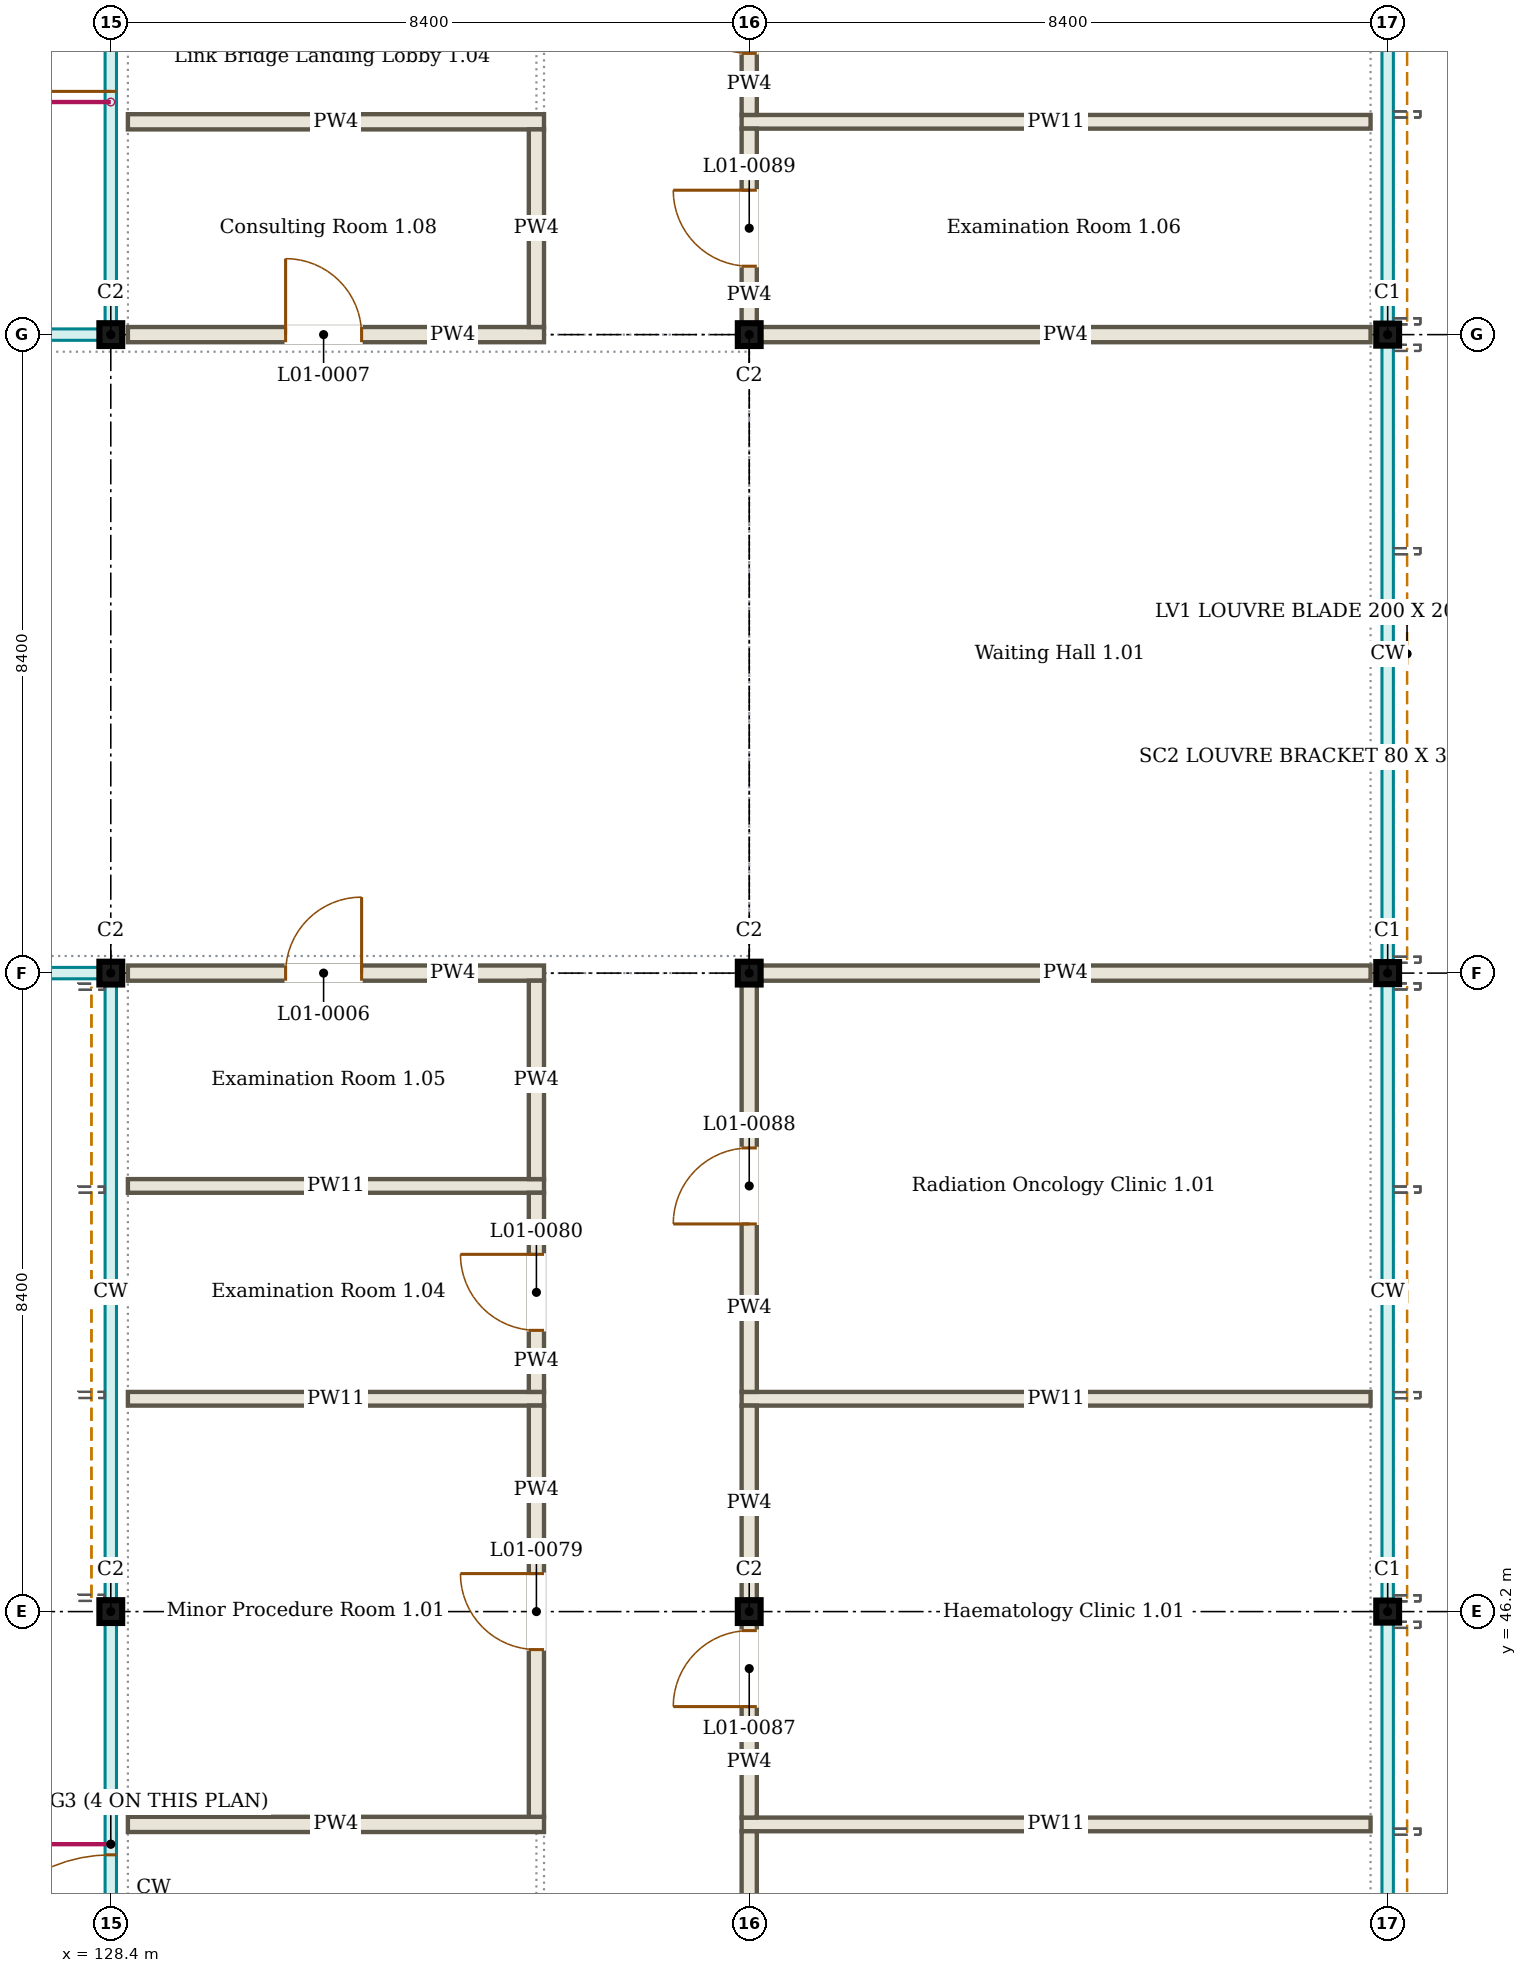
"""IFC4 building model, lengths in metres.
Left out: names, types, materials, properties, quantities, classifications, styles, units other than length and angle.
Written with IfcOpenShell. Run it as: python <this file> out.ifc"""

import sys

from ifc_helpers import new_model, si_unit, direction, frame, frame_2d, origin, origin_2d, place, context, subcontext, project, spatial, rectangle, i_section, extrude, element, fill, save


model = new_model("IFC4")
c1 = context("Model", 3, precision=1e-05, world=origin(), true_north=direction((0.0, 1.0)))
c2 = subcontext(c1, "Body", "Model", "MODEL_VIEW")
j1 = project(units=[si_unit("LENGTHUNIT", "METRE"), si_unit("PLANEANGLEUNIT", "RADIAN")], contexts=[c1])
p1 = place(None, origin())
s1 = spatial("IfcSite", under=j1, at=p1, CompositionType="ELEMENT")
p2 = place(p1, origin())
s2 = spatial("IfcBuilding", under=s1, at=p2, CompositionType="ELEMENT")
p3 = place(p2, frame((0.0, 0.0, 4.5)))
s3 = spatial("IfcBuildingStorey", under=s2, at=p3, CompositionType="ELEMENT", Elevation=4.5)
for number, where, z_axis, x_axis in (
    (1, (128.4, 46.2, 0.0), (0.0, 0.0, 1.0), (1.0, 0.0, 0.0)),
    (2, (136.8, 46.2, 0.0), (0.0, 0.0, 1.0), (1.0, 0.0, 0.0)),
):
    element("IfcColumn", number, at=place(p3, frame(where, z_axis=z_axis, x_axis=x_axis)), inside=s3, PredefinedType="COLUMN", context=c2, shape_type="SweptSolid", body=[
        extrude(i_section(OverallWidth=0.3, OverallDepth=0.3, WebThickness=0.011, FlangeThickness=0.019, FilletRadius=0.027, at=origin_2d()), origin(), (0.0, 0.0, 1.0), 4.5),
    ])
p4 = place(p3, frame((145.2, 46.2, 0.0), z_axis=(0.0, 0.0, 1.0), x_axis=(1.0, 0.0, 0.0)))
e3 = element("IfcColumn", 3, at=p4, inside=s3, PredefinedType="COLUMN", context=c2, shape_type="SweptSolid", body=[
    extrude(i_section(OverallWidth=0.3, OverallDepth=0.29, WebThickness=0.009, FlangeThickness=0.014, FilletRadius=0.027, at=origin_2d()), origin(), (0.0, 0.0, 1.0), 4.5),
])
for number, where, z_axis, x_axis in (
    (4, (128.4, 54.6, 0.0), (0.0, 0.0, 1.0), (1.0, 0.0, 0.0)),
    (5, (136.8, 54.6, 0.0), (0.0, 0.0, 1.0), (1.0, 0.0, 0.0)),
):
    element("IfcColumn", number, at=place(p3, frame(where, z_axis=z_axis, x_axis=x_axis)), inside=s3, PredefinedType="COLUMN", context=c2, shape_type="SweptSolid", body=[
        extrude(i_section(OverallWidth=0.3, OverallDepth=0.3, WebThickness=0.011, FlangeThickness=0.019, FilletRadius=0.027, at=origin_2d()), origin(), (0.0, 0.0, 1.0), 4.5),
    ])
p5 = place(p3, frame((145.2, 54.6, 0.0), z_axis=(0.0, 0.0, 1.0), x_axis=(1.0, 0.0, 0.0)))
e6 = element("IfcColumn", 6, at=p5, inside=s3, PredefinedType="COLUMN", context=c2, shape_type="SweptSolid", body=[
    extrude(i_section(OverallWidth=0.3, OverallDepth=0.29, WebThickness=0.009, FlangeThickness=0.014, FilletRadius=0.027, at=origin_2d()), origin(), (0.0, 0.0, 1.0), 4.5),
])
for number, where, z_axis, x_axis in (
    (7, (128.4, 63.0, 0.0), (0.0, 0.0, 1.0), (1.0, 0.0, 0.0)),
    (8, (136.8, 63.0, 0.0), (0.0, 0.0, 1.0), (1.0, 0.0, 0.0)),
):
    element("IfcColumn", number, at=place(p3, frame(where, z_axis=z_axis, x_axis=x_axis)), inside=s3, PredefinedType="COLUMN", context=c2, shape_type="SweptSolid", body=[
        extrude(i_section(OverallWidth=0.3, OverallDepth=0.3, WebThickness=0.011, FlangeThickness=0.019, FilletRadius=0.027, at=origin_2d()), origin(), (0.0, 0.0, 1.0), 4.5),
    ])
p6 = place(p3, frame((145.2, 63.0, 0.0), z_axis=(0.0, 0.0, 1.0), x_axis=(1.0, 0.0, 0.0)))
e9 = element("IfcColumn", 9, at=p6, inside=s3, PredefinedType="COLUMN", context=c2, shape_type="SweptSolid", body=[
    extrude(i_section(OverallWidth=0.3, OverallDepth=0.29, WebThickness=0.009, FlangeThickness=0.014, FilletRadius=0.027, at=origin_2d()), origin(), (0.0, 0.0, 1.0), 4.5),
])
p7 = place(p3, frame((128.625, 43.4, 0.0), z_axis=(0.0, 0.0, 1.0), x_axis=(1.0, 0.0, 0.0)))
e10 = element("IfcWall", 10, at=p7, inside=s3, PredefinedType="PARTITIONING", context=c2, shape_type="SweptSolid", body=[
    extrude(rectangle(XDim=5.475, YDim=0.2, at=frame_2d((2.738, 0.0))), origin(), (0.0, 0.0, 1.0), 3.996),
])
p8 = place(p3, frame((136.7, 43.4, 0.0), z_axis=(0.0, 0.0, 1.0), x_axis=(1.0, 0.0, 0.0)))
e11 = element("IfcWall", 11, at=p8, inside=s3, PredefinedType="PARTITIONING", context=c2, shape_type="SweptSolid", body=[
    extrude(rectangle(XDim=8.275, YDim=0.18, at=frame_2d((4.138, 0.0))), origin(), (0.0, 0.0, 1.0), 3.9),
])
p9 = place(p3, frame((128.625, 49.0, 0.0), z_axis=(0.0, 0.0, 1.0), x_axis=(1.0, 0.0, 0.0)))
e12 = element("IfcWall", 12, at=p9, inside=s3, PredefinedType="PARTITIONING", context=c2, shape_type="SweptSolid", body=[
    extrude(rectangle(XDim=5.475, YDim=0.18, at=frame_2d((2.738, 0.0))), origin(), (0.0, 0.0, 1.0), 3.996),
])
p10 = place(p3, frame((136.7, 49.0, 0.0), z_axis=(0.0, 0.0, 1.0), x_axis=(1.0, 0.0, 0.0)))
e13 = element("IfcWall", 13, at=p10, inside=s3, PredefinedType="PARTITIONING", context=c2, shape_type="SweptSolid", body=[
    extrude(rectangle(XDim=8.275, YDim=0.18, at=frame_2d((4.138, 0.0))), origin(), (0.0, 0.0, 1.0), 3.9),
])
p11 = place(p3, frame((128.625, 51.8, 0.0), z_axis=(0.0, 0.0, 1.0), x_axis=(1.0, 0.0, 0.0)))
e14 = element("IfcWall", 14, at=p11, inside=s3, PredefinedType="PARTITIONING", context=c2, shape_type="SweptSolid", body=[
    extrude(rectangle(XDim=5.475, YDim=0.18, at=frame_2d((2.738, 0.0))), origin(), (0.0, 0.0, 1.0), 3.996),
])
p12 = place(p3, frame((128.625, 54.6, 0.0), z_axis=(0.0, 0.0, 1.0), x_axis=(1.0, 0.0, 0.0)))
e15 = element("IfcWall", 15, at=p12, inside=s3, PredefinedType="PARTITIONING", context=c2, shape_type="SweptSolid", body=[
    extrude(rectangle(XDim=5.475, YDim=0.2, at=frame_2d((2.738, 0.0))), origin(), (0.0, 0.0, 1.0), 3.9),
])
p13 = place(p12, frame((2.075, 0.0, 0.0)))
e16 = element("IfcOpeningElement", 16, at=p13, cuts=e15, PredefinedType="OPENING", context=c2, shape_type="SweptSolid", body=[
    extrude(rectangle(XDim=1.0, YDim=2.1, at=frame_2d((0.5, 1.05))), frame((0.0, 0.11, 0.0), z_axis=(0.0, -1.0, 0.0), x_axis=(1.0, 0.0, 0.0)), (0.0, 0.0, 1.0), 0.22),
])
p14 = place(p3, frame((136.95, 54.6, 0.0), z_axis=(0.0, 0.0, 1.0), x_axis=(1.0, 0.0, 0.0)))
e17 = element("IfcWall", 17, at=p14, inside=s3, PredefinedType="PARTITIONING", context=c2, shape_type="SweptSolid", body=[
    extrude(rectangle(XDim=8.025, YDim=0.2, at=frame_2d((4.013, 0.0))), origin(), (0.0, 0.0, 1.0), 3.9),
])
p15 = place(p3, frame((128.625, 63.0, 0.0), z_axis=(0.0, 0.0, 1.0), x_axis=(1.0, 0.0, 0.0)))
e18 = element("IfcWall", 18, at=p15, inside=s3, PredefinedType="PARTITIONING", context=c2, shape_type="SweptSolid", body=[
    extrude(rectangle(XDim=5.475, YDim=0.2, at=frame_2d((2.738, 0.0))), origin(), (0.0, 0.0, 1.0), 3.9),
])
p16 = place(p15, frame((2.075, 0.0, 0.0)))
e19 = element("IfcOpeningElement", 19, at=p16, cuts=e18, PredefinedType="OPENING", context=c2, shape_type="SweptSolid", body=[
    extrude(rectangle(XDim=1.0, YDim=2.1, at=frame_2d((0.5, 1.05))), frame((0.0, 0.11, 0.0), z_axis=(0.0, -1.0, 0.0), x_axis=(1.0, 0.0, 0.0)), (0.0, 0.0, 1.0), 0.22),
])
p17 = place(p3, frame((136.95, 63.0, 0.0), z_axis=(0.0, 0.0, 1.0), x_axis=(1.0, 0.0, 0.0)))
e20 = element("IfcWall", 20, at=p17, inside=s3, PredefinedType="PARTITIONING", context=c2, shape_type="SweptSolid", body=[
    extrude(rectangle(XDim=8.025, YDim=0.2, at=frame_2d((4.013, 0.0))), origin(), (0.0, 0.0, 1.0), 3.9),
])
p18 = place(p3, frame((128.625, 65.8, 0.0), z_axis=(0.0, 0.0, 1.0), x_axis=(1.0, 0.0, 0.0)))
e21 = element("IfcWall", 21, at=p18, inside=s3, PredefinedType="PARTITIONING", context=c2, shape_type="SweptSolid", body=[
    extrude(rectangle(XDim=5.475, YDim=0.2, at=frame_2d((2.738, 0.0))), origin(), (0.0, 0.0, 1.0), 3.996),
])
p19 = place(p3, frame((136.7, 65.8, 0.0), z_axis=(0.0, 0.0, 1.0), x_axis=(1.0, 0.0, 0.0)))
e22 = element("IfcWall", 22, at=p19, inside=s3, PredefinedType="PARTITIONING", context=c2, shape_type="SweptSolid", body=[
    extrude(rectangle(XDim=8.275, YDim=0.18, at=frame_2d((4.138, 0.0))), origin(), (0.0, 0.0, 1.0), 3.9),
])
p20 = place(p3, frame((134.0, 43.5, 0.0), z_axis=(0.0, 0.0, 1.0), x_axis=(0.0, 1.0, 0.0)))
e23 = element("IfcWall", 23, at=p20, inside=s3, PredefinedType="PARTITIONING", context=c2, shape_type="SweptSolid", body=[
    extrude(rectangle(XDim=5.41, YDim=0.2, at=frame_2d((2.705, 0.0))), origin(), (0.0, 0.0, 1.0), 3.9),
])
p21 = place(p20, frame((2.2, 0.0, 0.0)))
e24 = element("IfcOpeningElement", 24, at=p21, cuts=e23, PredefinedType="OPENING", context=c2, shape_type="SweptSolid", body=[
    extrude(rectangle(XDim=1.0, YDim=2.1, at=frame_2d((0.5, 1.05))), frame((0.0, 0.11, 0.0), z_axis=(0.0, -1.0, 0.0), x_axis=(1.0, 0.0, 0.0)), (0.0, 0.0, 1.0), 0.22),
])
p22 = place(p3, frame((134.0, 49.09, 0.0), z_axis=(0.0, 0.0, 1.0), x_axis=(0.0, 1.0, 0.0)))
e25 = element("IfcWall", 25, at=p22, inside=s3, PredefinedType="PARTITIONING", context=c2, shape_type="SweptSolid", body=[
    extrude(rectangle(XDim=2.62, YDim=0.2, at=frame_2d((1.31, 0.0))), origin(), (0.0, 0.0, 1.0), 3.996),
])
p23 = place(p22, frame((0.81, 0.0, 0.0)))
e26 = element("IfcOpeningElement", 26, at=p23, cuts=e25, PredefinedType="OPENING", context=c2, shape_type="SweptSolid", body=[
    extrude(rectangle(XDim=1.0, YDim=2.1, at=frame_2d((0.5, 1.05))), frame((0.0, 0.11, 0.0), z_axis=(0.0, -1.0, 0.0), x_axis=(1.0, 0.0, 0.0)), (0.0, 0.0, 1.0), 0.22),
])
p24 = place(p3, frame((134.0, 51.89, 0.0), z_axis=(0.0, 0.0, 1.0), x_axis=(0.0, 1.0, 0.0)))
e27 = element("IfcWall", 27, at=p24, inside=s3, PredefinedType="PARTITIONING", context=c2, shape_type="SweptSolid", body=[
    extrude(rectangle(XDim=2.61, YDim=0.2, at=frame_2d((1.305, 0.0))), origin(), (0.0, 0.0, 1.0), 3.996),
])
p25 = place(p3, frame((134.0, 63.1, 0.0), z_axis=(0.0, 0.0, 1.0), x_axis=(0.0, 1.0, 0.0)))
e28 = element("IfcWall", 28, at=p25, inside=s3, PredefinedType="PARTITIONING", context=c2, shape_type="SweptSolid", body=[
    extrude(rectangle(XDim=2.6, YDim=0.2, at=frame_2d((1.3, 0.0))), origin(), (0.0, 0.0, 1.0), 3.996),
])
p26 = place(p3, frame((136.8, 37.8, 0.0), z_axis=(0.0, 0.0, 1.0), x_axis=(0.0, 1.0, 0.0)))
e29 = element("IfcWall", 29, at=p26, inside=s3, PredefinedType="PARTITIONING", context=c2, shape_type="SweptSolid", body=[
    extrude(rectangle(XDim=5.51, YDim=0.2, at=frame_2d((2.755, 0.0))), origin(), (0.0, 0.0, 1.0), 3.9),
])
p27 = place(p26, frame((2.3, 0.0, 0.0)))
e30 = element("IfcOpeningElement", 30, at=p27, cuts=e29, PredefinedType="OPENING", context=c2, shape_type="SweptSolid", body=[
    extrude(rectangle(XDim=1.0, YDim=2.1, at=frame_2d((0.5, 1.05))), frame((0.0, 0.11, 0.0), z_axis=(0.0, -1.0, 0.0), x_axis=(1.0, 0.0, 0.0)), (0.0, 0.0, 1.0), 0.22),
])
p28 = place(p3, frame((136.8, 43.49, 0.0), z_axis=(0.0, 0.0, 1.0), x_axis=(0.0, 1.0, 0.0)))
e31 = element("IfcWall", 31, at=p28, inside=s3, PredefinedType="PARTITIONING", context=c2, shape_type="SweptSolid", body=[
    extrude(rectangle(XDim=2.56, YDim=0.2, at=frame_2d((1.28, 0.0))), origin(), (0.0, 0.0, 1.0), 3.9),
])
p29 = place(p28, frame((1.46, 0.0, 0.0)))
e32 = element("IfcOpeningElement", 32, at=p29, cuts=e31, PredefinedType="OPENING", context=c2, shape_type="SweptSolid", body=[
    extrude(rectangle(XDim=1.0, YDim=2.1, at=frame_2d((0.5, 1.05))), frame((0.0, 0.11, 0.0), z_axis=(0.0, -1.0, 0.0), x_axis=(1.0, 0.0, 0.0)), (0.0, 0.0, 1.0), 0.22),
])
p30 = place(p3, frame((136.8, 46.35, 0.0), z_axis=(0.0, 0.0, 1.0), x_axis=(0.0, 1.0, 0.0)))
e33 = element("IfcWall", 33, at=p30, inside=s3, PredefinedType="PARTITIONING", context=c2, shape_type="SweptSolid", body=[
    extrude(rectangle(XDim=2.56, YDim=0.2, at=frame_2d((1.28, 0.0))), origin(), (0.0, 0.0, 1.0), 3.9),
])
p31 = place(p3, frame((136.8, 49.09, 0.0), z_axis=(0.0, 0.0, 1.0), x_axis=(0.0, 1.0, 0.0)))
e34 = element("IfcWall", 34, at=p31, inside=s3, PredefinedType="PARTITIONING", context=c2, shape_type="SweptSolid", body=[
    extrude(rectangle(XDim=5.36, YDim=0.2, at=frame_2d((2.68, 0.0))), origin(), (0.0, 0.0, 1.0), 3.9),
])
p32 = place(p31, frame((2.21, 0.0, 0.0)))
e35 = element("IfcOpeningElement", 35, at=p32, cuts=e34, PredefinedType="OPENING", context=c2, shape_type="SweptSolid", body=[
    extrude(rectangle(XDim=1.0, YDim=2.1, at=frame_2d((0.5, 1.05))), frame((0.0, 0.11, 0.0), z_axis=(0.0, -1.0, 0.0), x_axis=(1.0, 0.0, 0.0)), (0.0, 0.0, 1.0), 0.22),
])
p33 = place(p3, frame((136.8, 63.15, 0.0), z_axis=(0.0, 0.0, 1.0), x_axis=(0.0, 1.0, 0.0)))
e36 = element("IfcWall", 36, at=p33, inside=s3, PredefinedType="PARTITIONING", context=c2, shape_type="SweptSolid", body=[
    extrude(rectangle(XDim=2.56, YDim=0.2, at=frame_2d((1.28, 0.0))), origin(), (0.0, 0.0, 1.0), 3.9),
])
p34 = place(p33, frame((0.75, 0.0, 0.0)))
e37 = element("IfcOpeningElement", 37, at=p34, cuts=e36, PredefinedType="OPENING", context=c2, shape_type="SweptSolid", body=[
    extrude(rectangle(XDim=1.0, YDim=2.1, at=frame_2d((0.5, 1.05))), frame((0.0, 0.11, 0.0), z_axis=(0.0, -1.0, 0.0), x_axis=(1.0, 0.0, 0.0)), (0.0, 0.0, 1.0), 0.22),
])
p35 = place(p3, frame((136.8, 65.89, 0.0), z_axis=(0.0, 0.0, 1.0), x_axis=(0.0, 1.0, 0.0)))
e38 = element("IfcWall", 38, at=p35, inside=s3, PredefinedType="PARTITIONING", context=c2, shape_type="SweptSolid", body=[
    extrude(rectangle(XDim=2.62, YDim=0.2, at=frame_2d((1.31, 0.0))), origin(), (0.0, 0.0, 1.0), 3.9),
])
p36 = place(p35, frame((0.81, 0.0, 0.0)))
e39 = element("IfcOpeningElement", 39, at=p36, cuts=e38, PredefinedType="OPENING", context=c2, shape_type="SweptSolid", body=[
    extrude(rectangle(XDim=1.0, YDim=2.1, at=frame_2d((0.5, 1.05))), frame((0.0, 0.11, 0.0), z_axis=(0.0, -1.0, 0.0), x_axis=(1.0, 0.0, 0.0)), (0.0, 0.0, 1.0), 0.22),
])
p37 = place(p3, frame((128.4, 37.95, 0.0), z_axis=(0.0, 0.0, 1.0), x_axis=(0.0, 1.0, 0.0)))
p38 = place(p37, frame((3.05, 0.0, 0.0)))
p39 = place(p38, origin())
e40 = element("IfcDoor", 40, at=p39, inside=s3, OperationType="SINGLE_SWING_LEFT", PredefinedType="DOOR", context=c2, shape_type="SweptSolid", body=[
    extrude(rectangle(XDim=2.0, YDim=2.4, at=frame_2d((1.0, 1.2))), frame((0.0, 0.025, 0.0), z_axis=(0.0, -1.0, 0.0), x_axis=(1.0, 0.0, 0.0)), (0.0, 0.0, 1.0), 0.05),
])
p40 = place(p3, frame((128.4, 63.15, 0.0), z_axis=(0.0, 0.0, 1.0), x_axis=(0.0, 1.0, 0.0)))
p41 = place(p40, frame((3.05, 0.0, 0.0)))
p42 = place(p41, origin())
e41 = element("IfcDoor", 41, at=p42, inside=s3, OperationType="SINGLE_SWING_LEFT", PredefinedType="DOOR", context=c2, shape_type="SweptSolid", body=[
    extrude(rectangle(XDim=2.0, YDim=2.4, at=frame_2d((1.0, 1.2))), frame((0.0, 0.025, 0.0), z_axis=(0.0, -1.0, 0.0), x_axis=(1.0, 0.0, 0.0)), (0.0, 0.0, 1.0), 0.05),
])
p43 = place(p13, origin())
e42 = element("IfcDoor", 42, at=p43, inside=s3, OperationType="SINGLE_SWING_RIGHT", PredefinedType="DOOR", context=c2, shape_type="SweptSolid", body=[
    extrude(rectangle(XDim=1.0, YDim=2.1, at=frame_2d((0.5, 1.05))), frame((0.0, 0.025, 0.0), z_axis=(0.0, -1.0, 0.0), x_axis=(1.0, 0.0, 0.0)), (0.0, 0.0, 1.0), 0.05),
])
fill(e16, e42)
p44 = place(p16, origin())
e43 = element("IfcDoor", 43, at=p44, inside=s3, OperationType="SINGLE_SWING_LEFT", PredefinedType="DOOR", context=c2, shape_type="SweptSolid", body=[
    extrude(rectangle(XDim=1.0, YDim=2.1, at=frame_2d((0.5, 1.05))), frame((0.0, 0.025, 0.0), z_axis=(0.0, -1.0, 0.0), x_axis=(1.0, 0.0, 0.0)), (0.0, 0.0, 1.0), 0.05),
])
fill(e19, e43)
p45 = place(p21, origin())
e44 = element("IfcDoor", 44, at=p45, inside=s3, OperationType="SINGLE_SWING_RIGHT", PredefinedType="DOOR", context=c2, shape_type="SweptSolid", body=[
    extrude(rectangle(XDim=1.0, YDim=2.1, at=frame_2d((0.5, 1.05))), frame((0.0, 0.025, 0.0), z_axis=(0.0, -1.0, 0.0), x_axis=(1.0, 0.0, 0.0)), (0.0, 0.0, 1.0), 0.05),
])
fill(e24, e44)
p46 = place(p23, origin())
e45 = element("IfcDoor", 45, at=p46, inside=s3, OperationType="SINGLE_SWING_RIGHT", PredefinedType="DOOR", context=c2, shape_type="SweptSolid", body=[
    extrude(rectangle(XDim=1.0, YDim=2.1, at=frame_2d((0.5, 1.05))), frame((0.0, 0.025, 0.0), z_axis=(0.0, -1.0, 0.0), x_axis=(1.0, 0.0, 0.0)), (0.0, 0.0, 1.0), 0.05),
])
fill(e26, e45)
p47 = place(p29, origin())
e46 = element("IfcDoor", 46, at=p47, inside=s3, OperationType="SINGLE_SWING_LEFT", PredefinedType="DOOR", context=c2, shape_type="SweptSolid", body=[
    extrude(rectangle(XDim=1.0, YDim=2.1, at=frame_2d((0.5, 1.05))), frame((0.0, 0.025, 0.0), z_axis=(0.0, -1.0, 0.0), x_axis=(1.0, 0.0, 0.0)), (0.0, 0.0, 1.0), 0.05),
])
fill(e32, e46)
p48 = place(p32, origin())
e47 = element("IfcDoor", 47, at=p48, inside=s3, OperationType="SINGLE_SWING_LEFT", PredefinedType="DOOR", context=c2, shape_type="SweptSolid", body=[
    extrude(rectangle(XDim=1.0, YDim=2.1, at=frame_2d((0.5, 1.05))), frame((0.0, 0.025, 0.0), z_axis=(0.0, -1.0, 0.0), x_axis=(1.0, 0.0, 0.0)), (0.0, 0.0, 1.0), 0.05),
])
fill(e35, e47)
p49 = place(p34, origin())
e48 = element("IfcDoor", 48, at=p49, inside=s3, OperationType="SINGLE_SWING_RIGHT", PredefinedType="DOOR", context=c2, shape_type="SweptSolid", body=[
    extrude(rectangle(XDim=1.0, YDim=2.1, at=frame_2d((0.5, 1.05))), frame((0.0, 0.025, 0.0), z_axis=(0.0, -1.0, 0.0), x_axis=(1.0, 0.0, 0.0)), (0.0, 0.0, 1.0), 0.05),
])
fill(e37, e48)
p50 = place(p36, origin())
e49 = element("IfcDoor", 49, at=p50, inside=s3, OperationType="SINGLE_SWING_RIGHT", PredefinedType="DOOR", context=c2, shape_type="SweptSolid", body=[
    extrude(rectangle(XDim=1.0, YDim=2.1, at=frame_2d((0.5, 1.05))), frame((0.0, 0.025, 0.0), z_axis=(0.0, -1.0, 0.0), x_axis=(1.0, 0.0, 0.0)), (0.0, 0.0, 1.0), 0.05),
])
fill(e39, e49)
save(model, sys.argv[1])
